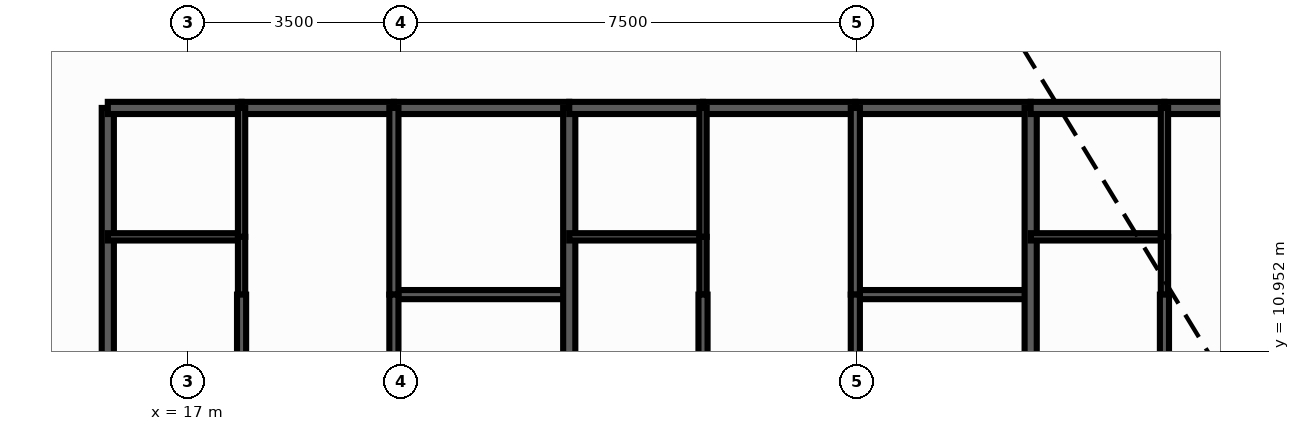
"""IFC4 building model, lengths in metres.
Left out: names, types, materials, properties, quantities, classifications, styles, units other than length and angle.
Written with IfcOpenShell. Run it as: python <this file> out.ifc"""

import sys

from ifc_helpers import new_model, si_unit, direction, frame, frame_2d, origin, place, context, subcontext, project, spatial, rectangle, extrude, source, transform, mapped, element, fill, save


model = new_model("IFC4")
c1 = context("Model", 3, precision=1e-05, world=origin(), true_north=direction((0.0, 1.0)))
c2 = subcontext(c1, "Body", "Model", "MODEL_VIEW")
j1 = project(units=[si_unit("LENGTHUNIT", "METRE"), si_unit("PLANEANGLEUNIT", "RADIAN")], contexts=[c1])
p1 = place(None, origin())
s1 = spatial("IfcSite", under=j1, at=p1, CompositionType="ELEMENT")
p2 = place(p1, origin())
s2 = spatial("IfcBuilding", under=s1, at=p2, CompositionType="ELEMENT")
p3 = place(p2, frame((0.0, 0.0, 19.4)))
s3 = spatial("IfcBuildingStorey", under=s2, at=p3, CompositionType="ELEMENT", Elevation=19.4)
p4 = place(p3, frame((15.68, 14.95, 0.0), z_axis=(0.0, 0.0, 1.0), x_axis=(0.0, -1.0, 0.0)))
e1 = element("IfcWall", 1, at=p4, inside=s3, PredefinedType="PARTITIONING", context=c2, shape_type="SweptSolid", body=[
    extrude(rectangle(XDim=11.8, YDim=0.2, at=frame_2d((5.9, 0.0))), origin(), (0.0, 0.0, 1.0), 2.79),
])
p5 = place(p3, frame((15.68, 14.95, 0.0), z_axis=(0.0, 0.0, 1.0), x_axis=(1.0, 0.0, 0.0)))
e2 = element("IfcWall", 2, at=p5, inside=s3, PredefinedType="PARTITIONING", context=c2, shape_type="SweptSolid", body=[
    extrude(rectangle(XDim=2.2, YDim=0.2, at=frame_2d((1.1, 0.0))), origin(), (0.0, 0.0, 1.0), 2.79),
])
p6 = place(p3, frame((17.88, 14.95, 0.0), z_axis=(0.0, 0.0, 1.0), x_axis=(1.0, 0.0, 0.0)))
e3 = element("IfcWall", 3, at=p6, inside=s3, PredefinedType="PARTITIONING", context=c2, shape_type="SweptSolid", body=[
    extrude(rectangle(XDim=2.505, YDim=0.2, at=frame_2d((1.252, 0.0))), origin(), (0.0, 0.0, 1.0), 2.79),
])
p7 = place(p6, frame((0.753, 0.0, 0.0)))
e4 = element("IfcOpeningElement", 4, at=p7, cuts=e3, PredefinedType="OPENING", context=c2, shape_type="SweptSolid", body=[
    extrude(rectangle(XDim=1.0, YDim=2.15, at=frame_2d((0.5, 1.075))), frame((0.0, 0.112, 0.0), z_axis=(0.0, -1.0, 0.0), x_axis=(1.0, 0.0, 0.0)), (0.0, 0.0, 1.0), 0.224),
])
p8 = place(p3, frame((20.385, 14.95, 0.0), z_axis=(0.0, 0.0, 1.0), x_axis=(1.0, 0.0, 0.0)))
e5 = element("IfcWall", 5, at=p8, inside=s3, PredefinedType="PARTITIONING", context=c2, shape_type="SweptSolid", body=[
    extrude(rectangle(XDim=2.884, YDim=0.2, at=frame_2d((1.442, 0.0))), origin(), (0.0, 0.0, 1.0), 2.79),
])
p9 = place(p3, frame((15.68, 12.83, 0.0), z_axis=(0.0, 0.0, 1.0), x_axis=(1.0, 0.0, 0.0)))
e6 = element("IfcWall", 6, at=p9, inside=s3, PredefinedType="PARTITIONING", context=c2, shape_type="SweptSolid", body=[
    extrude(rectangle(XDim=2.2, YDim=0.12, at=frame_2d((1.1, 0.0))), origin(), (0.0, 0.0, 1.0), 2.79),
])
p10 = place(p3, frame((20.385, 11.88, 0.0), z_axis=(0.0, 0.0, 1.0), x_axis=(1.0, 0.0, 0.0)))
e7 = element("IfcWall", 7, at=p10, inside=s3, PredefinedType="PARTITIONING", context=c2, shape_type="SweptSolid", body=[
    extrude(rectangle(XDim=2.884, YDim=0.15, at=frame_2d((1.442, 0.0))), origin(), (0.0, 0.0, 1.0), 2.79),
])
p11 = place(p3, frame((17.88, 14.95, 0.0), z_axis=(0.0, 0.0, 1.0), x_axis=(0.0, -1.0, 0.0)))
e8 = element("IfcWall", 8, at=p11, inside=s3, PredefinedType="PARTITIONING", context=c2, shape_type="SweptSolid", body=[
    extrude(rectangle(XDim=2.12, YDim=0.12, at=frame_2d((1.06, 0.0))), origin(), (0.0, 0.0, 1.0), 2.79),
])
p12 = place(p11, frame((0.635, 0.0, 0.0)))
e9 = element("IfcOpeningElement", 9, at=p12, cuts=e8, PredefinedType="OPENING", context=c2, shape_type="SweptSolid", body=[
    extrude(rectangle(XDim=0.85, YDim=2.05, at=frame_2d((0.425, 1.025))), frame((0.0, 0.072, 0.0), z_axis=(0.0, -1.0, 0.0), x_axis=(1.0, 0.0, 0.0)), (0.0, 0.0, 1.0), 0.144),
])
p13 = place(p3, frame((17.88, 12.83, 0.0), z_axis=(0.0, 0.0, 1.0), x_axis=(0.0, -1.0, 0.0)))
e10 = element("IfcWall", 10, at=p13, inside=s3, PredefinedType="PARTITIONING", context=c2, shape_type="SweptSolid", body=[
    extrude(rectangle(XDim=0.95, YDim=0.12, at=frame_2d((0.475, 0.0))), origin(), (0.0, 0.0, 1.0), 2.79),
])
p14 = place(p3, frame((17.88, 11.88, 0.0), z_axis=(0.0, 0.0, 1.0), x_axis=(0.0, -1.0, 0.0)))
e11 = element("IfcWall", 11, at=p14, inside=s3, PredefinedType="PARTITIONING", context=c2, shape_type="SweptSolid", body=[
    extrude(rectangle(XDim=8.73, YDim=0.15, at=frame_2d((4.365, 0.0))), origin(), (0.0, 0.0, 1.0), 2.79),
])
p15 = place(p14, frame((3.609, 0.0, 0.0)))
e12 = element("IfcOpeningElement", 12, at=p15, cuts=e11, PredefinedType="OPENING", context=c2, shape_type="SweptSolid", body=[
    extrude(rectangle(XDim=0.9, YDim=2.1, at=frame_2d((0.45, 1.05))), frame((0.0, 0.087, 0.0), z_axis=(0.0, -1.0, 0.0), x_axis=(1.0, 0.0, 0.0)), (0.0, 0.0, 1.0), 0.174),
])
p16 = place(p3, frame((20.385, 14.95, 0.0), z_axis=(0.0, 0.0, 1.0), x_axis=(0.0, -1.0, 0.0)))
e13 = element("IfcWall", 13, at=p16, inside=s3, PredefinedType="PARTITIONING", context=c2, shape_type="SweptSolid", body=[
    extrude(rectangle(XDim=3.07, YDim=0.15, at=frame_2d((1.535, 0.0))), origin(), (0.0, 0.0, 1.0), 2.79),
])
p17 = place(p16, frame((1.085, 0.0, 0.0)))
e14 = element("IfcOpeningElement", 14, at=p17, cuts=e13, PredefinedType="OPENING", context=c2, shape_type="SweptSolid", body=[
    extrude(rectangle(XDim=0.9, YDim=2.1, at=frame_2d((0.45, 1.05))), frame((0.0, 0.087, 0.0), z_axis=(0.0, -1.0, 0.0), x_axis=(1.0, 0.0, 0.0)), (0.0, 0.0, 1.0), 0.174),
])
p18 = place(p3, frame((20.385, 11.88, 0.0), z_axis=(0.0, 0.0, 1.0), x_axis=(0.0, -1.0, 0.0)))
e15 = element("IfcWall", 15, at=p18, inside=s3, PredefinedType="PARTITIONING", context=c2, shape_type="SweptSolid", body=[
    extrude(rectangle(XDim=8.73, YDim=0.15, at=frame_2d((4.365, 0.0))), origin(), (0.0, 0.0, 1.0), 2.79),
])
p19 = place(p18, frame((3.609, 0.0, 0.0)))
e16 = element("IfcOpeningElement", 16, at=p19, cuts=e15, PredefinedType="OPENING", context=c2, shape_type="SweptSolid", body=[
    extrude(rectangle(XDim=0.9, YDim=2.1, at=frame_2d((0.45, 1.05))), frame((0.0, 0.087, 0.0), z_axis=(0.0, -1.0, 0.0), x_axis=(1.0, 0.0, 0.0)), (0.0, 0.0, 1.0), 0.174),
])
p20 = place(p3, frame((23.269, 14.95, 0.0), z_axis=(0.0, 0.0, 1.0), x_axis=(0.0, -1.0, 0.0)))
e17 = element("IfcWall", 17, at=p20, inside=s3, PredefinedType="PARTITIONING", context=c2, shape_type="SweptSolid", body=[
    extrude(rectangle(XDim=11.8, YDim=0.2, at=frame_2d((5.9, 0.0))), origin(), (0.0, 0.0, 1.0), 2.79),
])
p21 = place(p3, frame((23.269, 14.95, 0.0), z_axis=(0.0, 0.0, 1.0), x_axis=(1.0, 0.0, 0.0)))
e18 = element("IfcWall", 18, at=p21, inside=s3, PredefinedType="PARTITIONING", context=c2, shape_type="SweptSolid", body=[
    extrude(rectangle(XDim=2.2, YDim=0.2, at=frame_2d((1.1, 0.0))), origin(), (0.0, 0.0, 1.0), 2.79),
])
p22 = place(p3, frame((25.469, 14.95, 0.0), z_axis=(0.0, 0.0, 1.0), x_axis=(1.0, 0.0, 0.0)))
e19 = element("IfcWall", 19, at=p22, inside=s3, PredefinedType="PARTITIONING", context=c2, shape_type="SweptSolid", body=[
    extrude(rectangle(XDim=2.505, YDim=0.2, at=frame_2d((1.252, 0.0))), origin(), (0.0, 0.0, 1.0), 2.79),
])
p23 = place(p22, frame((0.752, 0.0, 0.0)))
e20 = element("IfcOpeningElement", 20, at=p23, cuts=e19, PredefinedType="OPENING", context=c2, shape_type="SweptSolid", body=[
    extrude(rectangle(XDim=1.0, YDim=2.15, at=frame_2d((0.5, 1.075))), frame((0.0, 0.112, 0.0), z_axis=(0.0, -1.0, 0.0), x_axis=(1.0, 0.0, 0.0)), (0.0, 0.0, 1.0), 0.224),
])
p24 = place(p3, frame((27.974, 14.95, 0.0), z_axis=(0.0, 0.0, 1.0), x_axis=(1.0, 0.0, 0.0)))
e21 = element("IfcWall", 21, at=p24, inside=s3, PredefinedType="PARTITIONING", context=c2, shape_type="SweptSolid", body=[
    extrude(rectangle(XDim=2.884, YDim=0.2, at=frame_2d((1.442, 0.0))), origin(), (0.0, 0.0, 1.0), 2.79),
])
p25 = place(p3, frame((23.269, 12.83, 0.0), z_axis=(0.0, 0.0, 1.0), x_axis=(1.0, 0.0, 0.0)))
e22 = element("IfcWall", 22, at=p25, inside=s3, PredefinedType="PARTITIONING", context=c2, shape_type="SweptSolid", body=[
    extrude(rectangle(XDim=2.2, YDim=0.12, at=frame_2d((1.1, 0.0))), origin(), (0.0, 0.0, 1.0), 2.79),
])
p26 = place(p3, frame((27.974, 11.88, 0.0), z_axis=(0.0, 0.0, 1.0), x_axis=(1.0, 0.0, 0.0)))
e23 = element("IfcWall", 23, at=p26, inside=s3, PredefinedType="PARTITIONING", context=c2, shape_type="SweptSolid", body=[
    extrude(rectangle(XDim=2.884, YDim=0.15, at=frame_2d((1.442, 0.0))), origin(), (0.0, 0.0, 1.0), 2.79),
])
p27 = place(p3, frame((25.469, 14.95, 0.0), z_axis=(0.0, 0.0, 1.0), x_axis=(0.0, -1.0, 0.0)))
e24 = element("IfcWall", 24, at=p27, inside=s3, PredefinedType="PARTITIONING", context=c2, shape_type="SweptSolid", body=[
    extrude(rectangle(XDim=2.12, YDim=0.12, at=frame_2d((1.06, 0.0))), origin(), (0.0, 0.0, 1.0), 2.79),
])
p28 = place(p27, frame((0.635, 0.0, 0.0)))
e25 = element("IfcOpeningElement", 25, at=p28, cuts=e24, PredefinedType="OPENING", context=c2, shape_type="SweptSolid", body=[
    extrude(rectangle(XDim=0.85, YDim=2.05, at=frame_2d((0.425, 1.025))), frame((0.0, 0.072, 0.0), z_axis=(0.0, -1.0, 0.0), x_axis=(1.0, 0.0, 0.0)), (0.0, 0.0, 1.0), 0.144),
])
p29 = place(p3, frame((25.469, 12.83, 0.0), z_axis=(0.0, 0.0, 1.0), x_axis=(0.0, -1.0, 0.0)))
e26 = element("IfcWall", 26, at=p29, inside=s3, PredefinedType="PARTITIONING", context=c2, shape_type="SweptSolid", body=[
    extrude(rectangle(XDim=0.95, YDim=0.12, at=frame_2d((0.475, 0.0))), origin(), (0.0, 0.0, 1.0), 2.79),
])
p30 = place(p3, frame((25.469, 11.88, 0.0), z_axis=(0.0, 0.0, 1.0), x_axis=(0.0, -1.0, 0.0)))
e27 = element("IfcWall", 27, at=p30, inside=s3, PredefinedType="PARTITIONING", context=c2, shape_type="SweptSolid", body=[
    extrude(rectangle(XDim=8.73, YDim=0.15, at=frame_2d((4.365, 0.0))), origin(), (0.0, 0.0, 1.0), 2.79),
])
p31 = place(p30, frame((3.609, 0.0, 0.0)))
e28 = element("IfcOpeningElement", 28, at=p31, cuts=e27, PredefinedType="OPENING", context=c2, shape_type="SweptSolid", body=[
    extrude(rectangle(XDim=0.9, YDim=2.1, at=frame_2d((0.45, 1.05))), frame((0.0, 0.087, 0.0), z_axis=(0.0, -1.0, 0.0), x_axis=(1.0, 0.0, 0.0)), (0.0, 0.0, 1.0), 0.174),
])
p32 = place(p3, frame((27.974, 14.95, 0.0), z_axis=(0.0, 0.0, 1.0), x_axis=(0.0, -1.0, 0.0)))
e29 = element("IfcWall", 29, at=p32, inside=s3, PredefinedType="PARTITIONING", context=c2, shape_type="SweptSolid", body=[
    extrude(rectangle(XDim=3.07, YDim=0.15, at=frame_2d((1.535, 0.0))), origin(), (0.0, 0.0, 1.0), 2.79),
])
p33 = place(p32, frame((1.085, 0.0, 0.0)))
e30 = element("IfcOpeningElement", 30, at=p33, cuts=e29, PredefinedType="OPENING", context=c2, shape_type="SweptSolid", body=[
    extrude(rectangle(XDim=0.9, YDim=2.1, at=frame_2d((0.45, 1.05))), frame((0.0, 0.087, 0.0), z_axis=(0.0, -1.0, 0.0), x_axis=(1.0, 0.0, 0.0)), (0.0, 0.0, 1.0), 0.174),
])
p34 = place(p3, frame((27.974, 11.88, 0.0), z_axis=(0.0, 0.0, 1.0), x_axis=(0.0, -1.0, 0.0)))
e31 = element("IfcWall", 31, at=p34, inside=s3, PredefinedType="PARTITIONING", context=c2, shape_type="SweptSolid", body=[
    extrude(rectangle(XDim=8.73, YDim=0.15, at=frame_2d((4.365, 0.0))), origin(), (0.0, 0.0, 1.0), 2.79),
])
p35 = place(p34, frame((3.609, 0.0, 0.0)))
e32 = element("IfcOpeningElement", 32, at=p35, cuts=e31, PredefinedType="OPENING", context=c2, shape_type="SweptSolid", body=[
    extrude(rectangle(XDim=0.9, YDim=2.1, at=frame_2d((0.45, 1.05))), frame((0.0, 0.087, 0.0), z_axis=(0.0, -1.0, 0.0), x_axis=(1.0, 0.0, 0.0)), (0.0, 0.0, 1.0), 0.174),
])
p36 = place(p3, frame((30.858, 14.95, 0.0), z_axis=(0.0, 0.0, 1.0), x_axis=(0.0, -1.0, 0.0)))
e33 = element("IfcWall", 33, at=p36, inside=s3, PredefinedType="PARTITIONING", context=c2, shape_type="SweptSolid", body=[
    extrude(rectangle(XDim=11.8, YDim=0.2, at=frame_2d((5.9, 0.0))), origin(), (0.0, 0.0, 1.0), 2.24),
])
p37 = place(p3, frame((30.858, 14.95, 0.0), z_axis=(0.0, 0.0, 1.0), x_axis=(1.0, 0.0, 0.0)))
e34 = element("IfcWall", 34, at=p37, inside=s3, PredefinedType="PARTITIONING", context=c2, shape_type="SweptSolid", body=[
    extrude(rectangle(XDim=2.2, YDim=0.2, at=frame_2d((1.1, 0.0))), origin(), (0.0, 0.0, 1.0), 2.79),
])
p38 = place(p3, frame((33.058, 14.95, 0.0), z_axis=(0.0, 0.0, 1.0), x_axis=(1.0, 0.0, 0.0)))
e35 = element("IfcWall", 35, at=p38, inside=s3, PredefinedType="PARTITIONING", context=c2, shape_type="SweptSolid", body=[
    extrude(rectangle(XDim=2.367, YDim=0.2, at=frame_2d((1.183, 0.0))), origin(), (0.0, 0.0, 1.0), 2.79),
])
p39 = place(p38, frame((0.683, 0.0, 0.0)))
e36 = element("IfcOpeningElement", 36, at=p39, cuts=e35, PredefinedType="OPENING", context=c2, shape_type="SweptSolid", body=[
    extrude(rectangle(XDim=1.0, YDim=2.15, at=frame_2d((0.5, 1.075))), frame((0.0, 0.112, 0.0), z_axis=(0.0, -1.0, 0.0), x_axis=(1.0, 0.0, 0.0)), (0.0, 0.0, 1.0), 0.224),
])
p40 = place(p3, frame((30.858, 12.83, 0.0), z_axis=(0.0, 0.0, 1.0), x_axis=(1.0, 0.0, 0.0)))
e37 = element("IfcWall", 37, at=p40, inside=s3, PredefinedType="PARTITIONING", context=c2, shape_type="SweptSolid", body=[
    extrude(rectangle(XDim=2.2, YDim=0.12, at=frame_2d((1.1, 0.0))), origin(), (0.0, 0.0, 1.0), 2.79),
])
p41 = place(p3, frame((33.058, 14.95, 0.0), z_axis=(0.0, 0.0, 1.0), x_axis=(0.0, -1.0, 0.0)))
e38 = element("IfcWall", 38, at=p41, inside=s3, PredefinedType="PARTITIONING", context=c2, shape_type="SweptSolid", body=[
    extrude(rectangle(XDim=2.12, YDim=0.12, at=frame_2d((1.06, 0.0))), origin(), (0.0, 0.0, 1.0), 2.79),
])
p42 = place(p41, frame((0.635, 0.0, 0.0)))
e39 = element("IfcOpeningElement", 39, at=p42, cuts=e38, PredefinedType="OPENING", context=c2, shape_type="SweptSolid", body=[
    extrude(rectangle(XDim=0.85, YDim=2.05, at=frame_2d((0.425, 1.025))), frame((0.0, 0.072, 0.0), z_axis=(0.0, -1.0, 0.0), x_axis=(1.0, 0.0, 0.0)), (0.0, 0.0, 1.0), 0.144),
])
p43 = place(p3, frame((33.058, 12.83, 0.0), z_axis=(0.0, 0.0, 1.0), x_axis=(0.0, -1.0, 0.0)))
e40 = element("IfcWall", 40, at=p43, inside=s3, PredefinedType="PARTITIONING", context=c2, shape_type="SweptSolid", body=[
    extrude(rectangle(XDim=0.95, YDim=0.12, at=frame_2d((0.475, 0.0))), origin(), (0.0, 0.0, 1.0), 2.79),
])
p44 = place(p3, frame((33.058, 11.88, 0.0), z_axis=(0.0, 0.0, 1.0), x_axis=(0.0, -1.0, 0.0)))
e41 = element("IfcWall", 41, at=p44, inside=s3, PredefinedType="PARTITIONING", context=c2, shape_type="SweptSolid", body=[
    extrude(rectangle(XDim=8.73, YDim=0.15, at=frame_2d((4.365, 0.0))), origin(), (0.0, 0.0, 1.0), 2.79),
])
p45 = place(p44, frame((3.609, 0.0, 0.0)))
e42 = element("IfcOpeningElement", 42, at=p45, cuts=e41, PredefinedType="OPENING", context=c2, shape_type="SweptSolid", body=[
    extrude(rectangle(XDim=0.9, YDim=2.1, at=frame_2d((0.45, 1.05))), frame((0.0, 0.087, 0.0), z_axis=(0.0, -1.0, 0.0), x_axis=(1.0, 0.0, 0.0)), (0.0, 0.0, 1.0), 0.174),
])
m1 = source(origin(), c2, "Body", "SweptSolid", [
    extrude(rectangle(XDim=1.0, YDim=2.15, at=frame_2d((0.5, 1.075))), frame((0.0, 0.025, 0.0), z_axis=(0.0, -1.0, 0.0), x_axis=(1.0, 0.0, 0.0)), (0.0, 0.0, 1.0), 0.05),
])
p46 = place(p7, origin())
e43 = element("IfcDoor", 43, at=p46, inside=s3, OperationType="SINGLE_SWING_LEFT", PredefinedType="DOOR", context=c2, shape_type="MappedRepresentation", body=[
    mapped(m1, transform((0.0, 0.0, 0.0), scale=1.0)),
])
fill(e4, e43)
m2 = source(origin(), c2, "Body", "SweptSolid", [
    extrude(rectangle(XDim=0.85, YDim=2.05, at=frame_2d((0.425, 1.025))), frame((0.0, 0.025, 0.0), z_axis=(0.0, -1.0, 0.0), x_axis=(1.0, 0.0, 0.0)), (0.0, 0.0, 1.0), 0.05),
])
p47 = place(p12, origin())
e44 = element("IfcDoor", 44, at=p47, inside=s3, OperationType="SINGLE_SWING_RIGHT", PredefinedType="DOOR", context=c2, shape_type="MappedRepresentation", body=[
    mapped(m2, transform((0.0, 0.0, 0.0), scale=1.0)),
])
fill(e9, e44)
m3 = source(origin(), c2, "Body", "SweptSolid", [
    extrude(rectangle(XDim=0.9, YDim=2.1, at=frame_2d((0.45, 1.05))), frame((0.0, 0.025, 0.0), z_axis=(0.0, -1.0, 0.0), x_axis=(1.0, 0.0, 0.0)), (0.0, 0.0, 1.0), 0.05),
])
p48 = place(p17, origin())
e45 = element("IfcDoor", 45, at=p48, inside=s3, OperationType="SINGLE_SWING_RIGHT", PredefinedType="DOOR", context=c2, shape_type="MappedRepresentation", body=[
    mapped(m3, transform((0.0, 0.0, 0.0), scale=1.0)),
])
fill(e14, e45)
p49 = place(p23, origin())
e46 = element("IfcDoor", 46, at=p49, inside=s3, OperationType="SINGLE_SWING_RIGHT", PredefinedType="DOOR", context=c2, shape_type="MappedRepresentation", body=[
    mapped(m1, transform((0.0, 0.0, 0.0), scale=1.0)),
])
fill(e20, e46)
p50 = place(p28, origin())
e47 = element("IfcDoor", 47, at=p50, inside=s3, OperationType="SINGLE_SWING_LEFT", PredefinedType="DOOR", context=c2, shape_type="MappedRepresentation", body=[
    mapped(m2, transform((0.0, 0.0, 0.0), scale=1.0)),
])
fill(e25, e47)
p51 = place(p33, origin())
e48 = element("IfcDoor", 48, at=p51, inside=s3, OperationType="SINGLE_SWING_LEFT", PredefinedType="DOOR", context=c2, shape_type="MappedRepresentation", body=[
    mapped(m3, transform((0.0, 0.0, 0.0), scale=1.0)),
])
fill(e30, e48)
p52 = place(p39, origin())
e49 = element("IfcDoor", 49, at=p52, inside=s3, OperationType="SINGLE_SWING_LEFT", PredefinedType="DOOR", context=c2, shape_type="MappedRepresentation", body=[
    mapped(m1, transform((0.0, 0.0, 0.0), scale=1.0)),
])
fill(e36, e49)
p53 = place(p42, origin())
e50 = element("IfcDoor", 50, at=p53, inside=s3, OperationType="SINGLE_SWING_RIGHT", PredefinedType="DOOR", context=c2, shape_type="MappedRepresentation", body=[
    mapped(m2, transform((0.0, 0.0, 0.0), scale=1.0)),
])
fill(e39, e50)
save(model, sys.argv[1])
